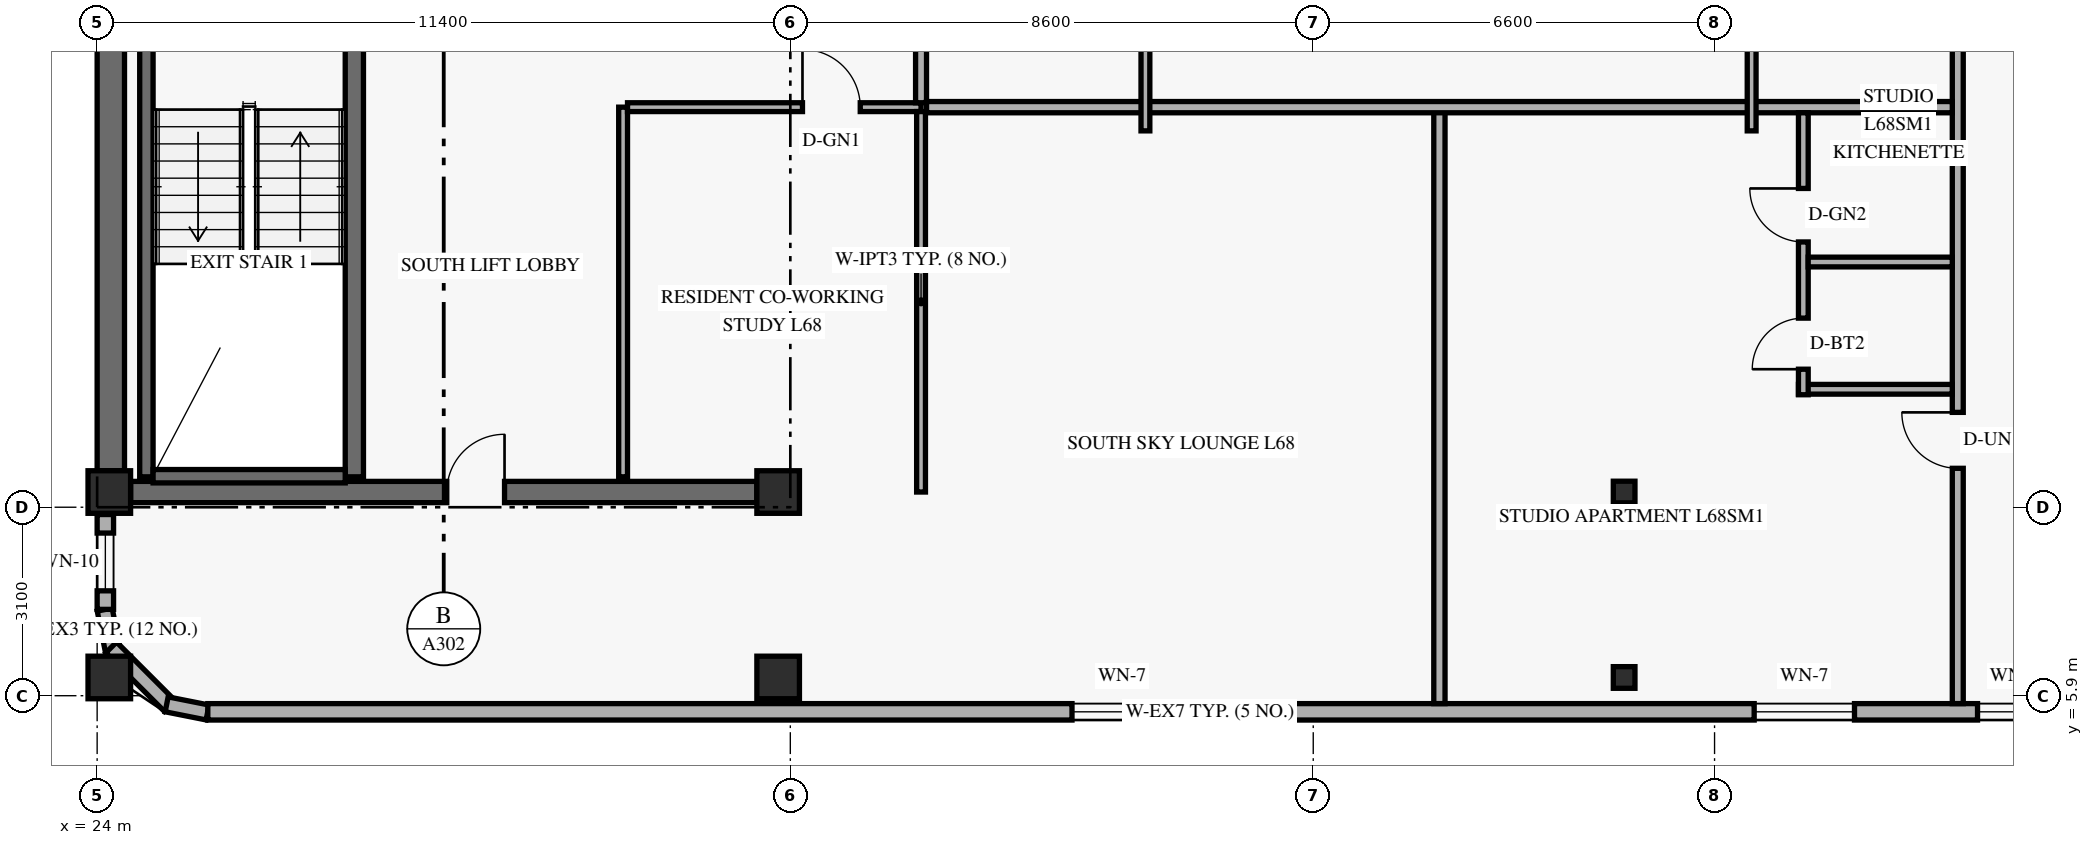
"""IFC4 building model, lengths in metres.
Left out: names, types, materials, properties, quantities, classifications, styles, units other than length and angle.
Written with IfcOpenShell. Run it as: python <this file> out.ifc"""

import sys

from ifc_helpers import new_model, si_unit, direction, frame, frame_2d, origin, origin_2d, place, context, subcontext, project, spatial, rectangle, hollow_rectangle, extrude, element, fill, save


model = new_model("IFC4")
c1 = context("Model", 3, precision=1e-05, world=origin(), true_north=direction((0.0, 1.0)))
c2 = subcontext(c1, "Body", "Model", "MODEL_VIEW")
j1 = project(units=[si_unit("LENGTHUNIT", "METRE"), si_unit("PLANEANGLEUNIT", "RADIAN")], contexts=[c1])
p1 = place(None, origin())
s1 = spatial("IfcSite", under=j1, at=p1, CompositionType="ELEMENT")
p2 = place(p1, origin())
s2 = spatial("IfcBuilding", under=s1, at=p2, CompositionType="ELEMENT")
p3 = place(p2, frame((0.0, 0.0, 260.4)))
s3 = spatial("IfcBuildingStorey", under=s2, at=p3, CompositionType="ELEMENT", Elevation=260.4)
p4 = place(p3, frame((24.225, 9.6, 0.0), z_axis=(0.0, 0.0, 1.0), x_axis=(0.0, 1.0, 0.0)))
e1 = element("IfcWall", 1, at=p4, inside=s3, PredefinedType="SHEAR", context=c2, shape_type="SweptSolid", body=[
    extrude(rectangle(XDim=7.6, YDim=0.45, at=frame_2d((3.8, 0.0))), origin(), (0.0, 0.0, 1.0), 2.821),
])
p5 = place(p3, frame((24.55, 9.25, 0.0), z_axis=(0.0, 0.0, 1.0), x_axis=(1.0, 0.0, 0.0)))
e2 = element("IfcWall", 2, at=p5, inside=s3, PredefinedType="SHEAR", context=c2, shape_type="SweptSolid", body=[
    extrude(rectangle(XDim=10.3, YDim=0.35, at=frame_2d((5.15, 0.0))), origin(), (0.0, 0.0, 1.0), 3.36),
])
p6 = place(p5, frame((5.2, 0.0, 0.0)))
e3 = element("IfcOpeningElement", 3, at=p6, cuts=e2, PredefinedType="OPENING", context=c2, shape_type="SweptSolid", body=[
    extrude(rectangle(XDim=0.95, YDim=2.15, at=frame_2d((0.475, 1.075))), frame((0.0, 0.185, 0.0), z_axis=(0.0, -1.0, 0.0), x_axis=(1.0, 0.0, 0.0)), (0.0, 0.0, 1.0), 0.37),
])
p7 = place(p3, frame((24.81, 9.5, 0.0), z_axis=(0.0, 0.0, 1.0), x_axis=(0.0, 1.0, 0.0)))
e4 = element("IfcWall", 4, at=p7, inside=s3, PredefinedType="SHEAR", context=c2, shape_type="SweptSolid", body=[
    extrude(rectangle(XDim=7.76, YDim=0.22, at=frame_2d((3.88, 0.0))), origin(), (0.0, 0.0, 1.0), 3.36),
])
p8 = place(p3, frame((28.23, 9.5, 0.0), z_axis=(0.0, 0.0, 1.0), x_axis=(0.0, 1.0, 0.0)))
e5 = element("IfcWall", 5, at=p8, inside=s3, PredefinedType="SHEAR", context=c2, shape_type="SweptSolid", body=[
    extrude(rectangle(XDim=7.76, YDim=0.3, at=frame_2d((3.88, 0.0))), origin(), (0.0, 0.0, 1.0), 3.36),
])
p9 = place(p3, frame((24.92, 9.51, 0.0), z_axis=(0.0, 0.0, 1.0), x_axis=(1.0, 0.0, 0.0)))
e6 = element("IfcWall", 6, at=p9, inside=s3, PredefinedType="SHEAR", context=c2, shape_type="SweptSolid", body=[
    extrude(rectangle(XDim=3.16, YDim=0.22, at=frame_2d((1.58, 0.0))), origin(), (0.0, 0.0, 1.0), 3.36),
])
for number, where, z_axis, x_axis in (
    (7, (24.2, 6.2, 0.0), (0.0, 0.0, 1.0), (1.0, 0.0, 0.0)),
    (8, (24.2, 9.25, 0.0), (0.0, 0.0, 1.0), (1.0, 0.0, 0.0)),
    (9, (35.2, 6.2, 0.0), (0.0, 0.0, 1.0), (1.0, 0.0, 0.0)),
    (10, (35.2, 9.25, 0.0), (0.0, 0.0, 1.0), (1.0, 0.0, 0.0)),
):
    element("IfcColumn", number, at=place(p3, frame(where, z_axis=z_axis, x_axis=x_axis)), inside=s3, PredefinedType="COLUMN", context=c2, shape_type="SweptSolid", body=[
        extrude(rectangle(XDim=0.7, YDim=0.7, at=origin_2d()), origin(), (0.0, 0.0, 1.0), 3.6),
    ])
for number, where, z_axis, x_axis in (
    (11, (49.05, 6.2, 0.0), (0.035, 0.0, 0.999), (0.0, 1.0, 0.0)),
    (12, (49.05, 9.25, 0.0), (0.035, 0.0, 0.999), (0.0, 1.0, 0.0)),
):
    element("IfcColumn", number, at=place(p3, frame(where, z_axis=z_axis, x_axis=x_axis)), inside=s3, PredefinedType="COLUMN", context=c2, shape_type="SweptSolid", body=[
        extrude(hollow_rectangle(XDim=0.356, YDim=0.356, WallThickness=0.016, at=origin_2d()), origin(), (0.0, 0.0, 1.0), 3.602),
    ])
p10 = place(p3, frame((24.124, 7.316, 0.0), z_axis=(0.0, 0.0, 1.0), x_axis=(0.194952956674, -0.980812594069, 0.0)))
e13 = element("IfcWall", 13, at=p10, inside=s3, PredefinedType="SOLIDWALL", context=c2, shape_type="SweptSolid", body=[
    extrude(rectangle(XDim=0.686, YDim=0.25, at=frame_2d((0.343, 0.0))), origin(), (0.0, 0.0, 1.0), 2.803),
])
p11 = place(p3, frame((24.231, 6.694, 0.0), z_axis=(0.0, 0.0, 1.0), x_axis=(0.707106781187, -0.707106781187, 0.0)))
e14 = element("IfcWall", 14, at=p11, inside=s3, PredefinedType="SOLIDWALL", context=c2, shape_type="SweptSolid", body=[
    extrude(rectangle(XDim=1.362, YDim=0.25, at=frame_2d((0.681, 0.0))), origin(), (0.0, 0.0, 1.0), 2.803),
])
p12 = place(p3, frame((25.143, 5.758, 0.0), z_axis=(0.0, 0.0, 1.0), x_axis=(0.980812594069, -0.194952956674, 0.0)))
e15 = element("IfcWall", 15, at=p12, inside=s3, PredefinedType="SOLIDWALL", context=c2, shape_type="SweptSolid", body=[
    extrude(rectangle(XDim=0.686, YDim=0.25, at=frame_2d((0.343, 0.0))), origin(), (0.0, 0.0, 1.0), 3.36),
])
p13 = place(p3, frame((25.82, 5.635, 0.0), z_axis=(0.0, 0.0, 1.0), x_axis=(1.0, 0.0, 0.0)))
e16 = element("IfcWall", 16, at=p13, inside=s3, PredefinedType="SOLIDWALL", context=c2, shape_type="SweptSolid", body=[
    extrude(rectangle(XDim=32.96, YDim=0.27, at=frame_2d((16.48, 0.0))), origin(), (0.0, 0.0, 1.0), 3.36),
])
p14 = place(p13, frame((14.212, 0.0, 0.85)))
e17 = element("IfcOpeningElement", 17, at=p14, cuts=e16, PredefinedType="OPENING", context=c2, shape_type="SweptSolid", body=[
    extrude(rectangle(XDim=1.65, YDim=1.6, at=frame_2d((0.825, 0.8))), frame((0.0, 0.145, 0.0), z_axis=(0.0, -1.0, 0.0), x_axis=(1.0, 0.0, 0.0)), (0.0, 0.0, 1.0), 0.29),
])
p15 = place(p13, frame((25.431, 0.0, 0.85)))
e18 = element("IfcOpeningElement", 18, at=p15, cuts=e16, PredefinedType="OPENING", context=c2, shape_type="SweptSolid", body=[
    extrude(rectangle(XDim=1.65, YDim=1.6, at=frame_2d((0.825, 0.8))), frame((0.0, 0.145, 0.0), z_axis=(0.0, -1.0, 0.0), x_axis=(1.0, 0.0, 0.0)), (0.0, 0.0, 1.0), 0.29),
])
p16 = place(p13, frame((29.105, 0.0, 0.85)))
e19 = element("IfcOpeningElement", 19, at=p16, cuts=e16, PredefinedType="OPENING", context=c2, shape_type="SweptSolid", body=[
    extrude(rectangle(XDim=1.2, YDim=1.5, at=frame_2d((0.6, 0.75))), frame((0.0, 0.145, 0.0), z_axis=(0.0, -1.0, 0.0), x_axis=(1.0, 0.0, 0.0)), (0.0, 0.0, 1.0), 0.29),
])
p17 = place(p3, frame((24.135, 7.32, 0.0), z_axis=(0.0, 0.0, 1.0), x_axis=(0.0, 1.0, 0.0)))
e20 = element("IfcWall", 20, at=p17, inside=s3, PredefinedType="SOLIDWALL", context=c2, shape_type="SweptSolid", body=[
    extrude(rectangle(XDim=1.56, YDim=0.27, at=frame_2d((0.78, 0.0))), origin(), (0.0, 0.0, 1.0), 2.803),
])
p18 = place(p17, frame((0.305, 0.0, 0.85)))
e21 = element("IfcOpeningElement", 21, at=p18, cuts=e20, PredefinedType="OPENING", context=c2, shape_type="SweptSolid", body=[
    extrude(rectangle(XDim=0.95, YDim=1.5, at=frame_2d((0.475, 0.75))), frame((0.0, 0.145, 0.0), z_axis=(0.0, -1.0, 0.0), x_axis=(1.0, 0.0, 0.0)), (0.0, 0.0, 1.0), 0.29),
])
p19 = place(p3, frame((32.65, 9.5, 0.0), z_axis=(0.0, 0.0, 1.0), x_axis=(0.0, 1.0, 0.0)))
e22 = element("IfcWall", 22, at=p19, inside=s3, PredefinedType="PARTITIONING", context=c2, shape_type="SweptSolid", body=[
    extrude(rectangle(XDim=6.08, YDim=0.145, at=frame_2d((3.04, 0.0))), origin(), (0.0, 0.0, 1.0), 3.36),
])
p20 = place(p3, frame((32.722, 15.58, 0.0), z_axis=(0.0, 0.0, 1.0), x_axis=(1.0, 0.0, 0.0)))
e23 = element("IfcWall", 23, at=p20, inside=s3, PredefinedType="PARTITIONING", context=c2, shape_type="SweptSolid", body=[
    extrude(rectangle(XDim=4.828, YDim=0.145, at=frame_2d((2.414, 0.0))), origin(), (0.0, 0.0, 1.0), 2.803),
])
p21 = place(p20, frame((2.877, 0.0, 0.0)))
e24 = element("IfcOpeningElement", 24, at=p21, cuts=e23, PredefinedType="OPENING", context=c2, shape_type="SweptSolid", body=[
    extrude(rectangle(XDim=0.95, YDim=2.15, at=frame_2d((0.475, 1.075))), frame((0.0, 0.083, 0.0), z_axis=(0.0, -1.0, 0.0), x_axis=(1.0, 0.0, 0.0)), (0.0, 0.0, 1.0), 0.165),
])
p22 = place(p3, frame((37.55, 9.25, 0.0), z_axis=(0.0, 0.0, 1.0), x_axis=(0.0, 1.0, 0.0)))
e25 = element("IfcWall", 25, at=p22, inside=s3, PredefinedType="PARTITIONING", context=c2, shape_type="SweptSolid", body=[
    extrude(rectangle(XDim=6.258, YDim=0.145, at=frame_2d((3.129, 0.0))), origin(), (0.0, 0.0, 1.0), 2.803),
])
p23 = place(p3, frame((37.55, 15.653, 0.0), z_axis=(0.0, 0.0, 1.0), x_axis=(0.0, 1.0, 0.0)))
e26 = element("IfcWall", 26, at=p23, inside=s3, PredefinedType="STANDARD", context=c2, shape_type="SweptSolid", body=[
    extrude(rectangle(XDim=9.347, YDim=0.18, at=frame_2d((4.674, 0.0))), origin(), (0.0, 0.0, 1.0), 2.803),
])
p24 = place(p3, frame((54.6, 5.77, 0.0), z_axis=(0.0, 0.0, 1.0), x_axis=(0.0, 1.0, 0.0)))
e27 = element("IfcWall", 27, at=p24, inside=s3, PredefinedType="STANDARD", context=c2, shape_type="SweptSolid", body=[
    extrude(rectangle(XDim=19.23, YDim=0.18, at=frame_2d((9.615, 0.0))), origin(), (0.0, 0.0, 1.0), 2.803),
])
p25 = place(p24, frame((3.87, 0.0, 0.0)))
e28 = element("IfcOpeningElement", 28, at=p25, cuts=e27, PredefinedType="OPENING", context=c2, shape_type="SweptSolid", body=[
    extrude(rectangle(XDim=0.92, YDim=2.15, at=frame_2d((0.46, 1.075))), frame((0.0, 0.1, 0.0), z_axis=(0.0, -1.0, 0.0), x_axis=(1.0, 0.0, 0.0)), (0.0, 0.0, 1.0), 0.2),
])
p26 = place(p3, frame((46.075, 5.77, 0.0), z_axis=(0.0, 0.0, 1.0), x_axis=(0.0, 1.0, 0.0)))
e29 = element("IfcWall", 29, at=p26, inside=s3, PredefinedType="PARTITIONING", context=c2, shape_type="SweptSolid", body=[
    extrude(rectangle(XDim=9.81, YDim=0.185, at=frame_2d((4.905, 0.0))), origin(), (0.0, 0.0, 1.0), 2.803),
])
p27 = place(p3, frame((37.64, 15.58, 0.0), z_axis=(0.0, 0.0, 1.0), x_axis=(1.0, 0.0, 0.0)))
e30 = element("IfcWall", 30, at=p27, inside=s3, PredefinedType="PARTITIONING", context=c2, shape_type="SweptSolid", body=[
    extrude(rectangle(XDim=16.87, YDim=0.185, at=frame_2d((8.435, 0.0))), origin(), (0.0, 0.0, 1.0), 2.803),
])
p28 = place(p3, frame((51.98, 10.94, 0.0), z_axis=(0.0, 0.0, 1.0), x_axis=(1.0, 0.0, 0.0)))
e31 = element("IfcWall", 31, at=p28, inside=s3, PredefinedType="PLUMBINGWALL", context=c2, shape_type="SweptSolid", body=[
    extrude(rectangle(XDim=2.53, YDim=0.16, at=frame_2d((1.265, 0.0))), origin(), (0.0, 0.0, 1.0), 3.36),
])
p29 = place(p3, frame((52.06, 10.85, 0.0), z_axis=(0.0, 0.0, 1.0), x_axis=(0.0, 1.0, 0.0)))
e32 = element("IfcWall", 32, at=p29, inside=s3, PredefinedType="PLUMBINGWALL", context=c2, shape_type="SweptSolid", body=[
    extrude(rectangle(XDim=4.637, YDim=0.16, at=frame_2d((2.319, 0.0))), origin(), (0.0, 0.0, 1.0), 3.039),
])
p30 = place(p29, frame((0.42, 0.0, 0.0)))
e33 = element("IfcOpeningElement", 33, at=p30, cuts=e32, PredefinedType="OPENING", context=c2, shape_type="SweptSolid", body=[
    extrude(rectangle(XDim=0.84, YDim=2.12, at=frame_2d((0.42, 1.06))), frame((0.0, 0.09, 0.0), z_axis=(0.0, -1.0, 0.0), x_axis=(1.0, 0.0, 0.0)), (0.0, 0.0, 1.0), 0.18),
])
p31 = place(p29, frame((2.513, 0.0, 0.0)))
e34 = element("IfcOpeningElement", 34, at=p31, cuts=e32, PredefinedType="OPENING", context=c2, shape_type="SweptSolid", body=[
    extrude(rectangle(XDim=0.88, YDim=2.12, at=frame_2d((0.44, 1.06))), frame((0.0, 0.09, 0.0), z_axis=(0.0, -1.0, 0.0), x_axis=(1.0, 0.0, 0.0)), (0.0, 0.0, 1.0), 0.18),
])
p32 = place(p3, frame((52.14, 13.033, 0.0), z_axis=(0.0, 0.0, 1.0), x_axis=(1.0, 0.0, 0.0)))
e35 = element("IfcWall", 35, at=p32, inside=s3, PredefinedType="PLUMBINGWALL", context=c2, shape_type="SweptSolid", body=[
    extrude(rectangle(XDim=2.37, YDim=0.16, at=frame_2d((1.185, 0.0))), origin(), (0.0, 0.0, 1.0), 3.36),
])
p33 = place(p3, frame((51.21, 15.19, 0.0), z_axis=(0.0, 0.0, 1.0), x_axis=(0.0, 1.0, 0.0)))
e36 = element("IfcWall", 36, at=p33, inside=s3, PredefinedType="PARTITIONING", context=c2, shape_type="SweptSolid", body=[
    extrude(rectangle(XDim=9.72, YDim=0.145, at=frame_2d((4.86, 0.0))), origin(), (0.0, 0.0, 1.0), 2.803),
])
p34 = place(p33, frame((2.445, 0.0, 0.0)))
e37 = element("IfcOpeningElement", 37, at=p34, cuts=e36, PredefinedType="OPENING", context=c2, shape_type="SweptSolid", body=[
    extrude(rectangle(XDim=0.88, YDim=2.14, at=frame_2d((0.44, 1.07))), frame((0.0, 0.083, 0.0), z_axis=(0.0, -1.0, 0.0), x_axis=(1.0, 0.0, 0.0)), (0.0, 0.0, 1.0), 0.165),
])
p35 = place(p33, frame((5.84, 0.0, 0.0)))
e38 = element("IfcOpeningElement", 38, at=p35, cuts=e36, PredefinedType="OPENING", context=c2, shape_type="SweptSolid", body=[
    extrude(rectangle(XDim=0.88, YDim=2.12, at=frame_2d((0.44, 1.06))), frame((0.0, 0.083, 0.0), z_axis=(0.0, -1.0, 0.0), x_axis=(1.0, 0.0, 0.0)), (0.0, 0.0, 1.0), 0.165),
])
p36 = place(p3, frame((41.24, 15.19, 0.0), z_axis=(0.0, 0.0, 1.0), x_axis=(0.0, 1.0, 0.0)))
e39 = element("IfcWall", 39, at=p36, inside=s3, PredefinedType="PARTITIONING", context=c2, shape_type="SweptSolid", body=[
    extrude(rectangle(XDim=9.72, YDim=0.145, at=frame_2d((4.86, 0.0))), origin(), (0.0, 0.0, 1.0), 2.803),
])
p37 = place(p36, frame((4.17, 0.0, 0.0)))
e40 = element("IfcOpeningElement", 40, at=p37, cuts=e39, PredefinedType="OPENING", context=c2, shape_type="SweptSolid", body=[
    extrude(rectangle(XDim=0.95, YDim=2.15, at=frame_2d((0.475, 1.075))), frame((0.0, 0.083, 0.0), z_axis=(0.0, -1.0, 0.0), x_axis=(1.0, 0.0, 0.0)), (0.0, 0.0, 1.0), 0.165),
])
p38 = place(p14, origin())
e41 = element("IfcWindow", 41, at=p38, inside=s3, PartitioningType="SINGLE_PANEL", PredefinedType="WINDOW", context=c2, shape_type="SweptSolid", body=[
    extrude(rectangle(XDim=1.65, YDim=1.6, at=frame_2d((0.825, 0.8))), frame((0.0, 0.03, 0.0), z_axis=(0.0, -1.0, 0.0), x_axis=(1.0, 0.0, 0.0)), (0.0, 0.0, 1.0), 0.06),
])
fill(e17, e41)
p39 = place(p15, origin())
e42 = element("IfcWindow", 42, at=p39, inside=s3, PartitioningType="SINGLE_PANEL", PredefinedType="WINDOW", context=c2, shape_type="SweptSolid", body=[
    extrude(rectangle(XDim=1.65, YDim=1.6, at=frame_2d((0.825, 0.8))), frame((0.0, 0.03, 0.0), z_axis=(0.0, -1.0, 0.0), x_axis=(1.0, 0.0, 0.0)), (0.0, 0.0, 1.0), 0.06),
])
fill(e18, e42)
p40 = place(p16, origin())
e43 = element("IfcWindow", 43, at=p40, inside=s3, PartitioningType="SINGLE_PANEL", PredefinedType="WINDOW", context=c2, shape_type="SweptSolid", body=[
    extrude(rectangle(XDim=1.2, YDim=1.5, at=frame_2d((0.6, 0.75))), frame((0.0, 0.03, 0.0), z_axis=(0.0, -1.0, 0.0), x_axis=(1.0, 0.0, 0.0)), (0.0, 0.0, 1.0), 0.06),
])
fill(e19, e43)
p41 = place(p18, origin())
e44 = element("IfcWindow", 44, at=p41, inside=s3, PartitioningType="SINGLE_PANEL", PredefinedType="WINDOW", context=c2, shape_type="SweptSolid", body=[
    extrude(rectangle(XDim=0.95, YDim=1.5, at=frame_2d((0.475, 0.75))), frame((0.0, 0.03, 0.0), z_axis=(0.0, -1.0, 0.0), x_axis=(1.0, 0.0, 0.0)), (0.0, 0.0, 1.0), 0.06),
])
fill(e21, e44)
p42 = place(p21, origin())
e45 = element("IfcDoor", 45, at=p42, inside=s3, OperationType="SINGLE_SWING_LEFT", PredefinedType="DOOR", context=c2, shape_type="SweptSolid", body=[
    extrude(rectangle(XDim=0.95, YDim=2.15, at=frame_2d((0.475, 1.075))), frame((0.0, 0.025, 0.0), z_axis=(0.0, -1.0, 0.0), x_axis=(1.0, 0.0, 0.0)), (0.0, 0.0, 1.0), 0.05),
])
fill(e24, e45)
p43 = place(p6, frame((0.95, 0.0, 0.0), z_axis=(0.0, 0.0, 1.0), x_axis=(-1.0, 0.0, 0.0)))
e46 = element("IfcDoor", 46, at=p43, inside=s3, OperationType="SINGLE_SWING_LEFT", PredefinedType="DOOR", context=c2, shape_type="SweptSolid", body=[
    extrude(rectangle(XDim=0.95, YDim=2.15, at=frame_2d((0.475, 1.075))), frame((0.0, 0.025, 0.0), z_axis=(0.0, -1.0, 0.0), x_axis=(1.0, 0.0, 0.0)), (0.0, 0.0, 1.0), 0.05),
])
fill(e3, e46)
p44 = place(p25, origin())
e47 = element("IfcDoor", 47, at=p44, inside=s3, OperationType="SINGLE_SWING_RIGHT", PredefinedType="DOOR", context=c2, shape_type="SweptSolid", body=[
    extrude(rectangle(XDim=0.92, YDim=2.15, at=frame_2d((0.46, 1.075))), frame((0.0, 0.025, 0.0), z_axis=(0.0, -1.0, 0.0), x_axis=(1.0, 0.0, 0.0)), (0.0, 0.0, 1.0), 0.05),
])
fill(e28, e47)
p45 = place(p30, origin())
e48 = element("IfcDoor", 48, at=p45, inside=s3, OperationType="SINGLE_SWING_LEFT", PredefinedType="DOOR", context=c2, shape_type="SweptSolid", body=[
    extrude(rectangle(XDim=0.84, YDim=2.12, at=frame_2d((0.42, 1.06))), frame((0.0, 0.025, 0.0), z_axis=(0.0, -1.0, 0.0), x_axis=(1.0, 0.0, 0.0)), (0.0, 0.0, 1.0), 0.05),
])
fill(e33, e48)
p46 = place(p31, origin())
e49 = element("IfcDoor", 49, at=p46, inside=s3, OperationType="SINGLE_SWING_RIGHT", PredefinedType="DOOR", context=c2, shape_type="SweptSolid", body=[
    extrude(rectangle(XDim=0.88, YDim=2.12, at=frame_2d((0.44, 1.06))), frame((0.0, 0.025, 0.0), z_axis=(0.0, -1.0, 0.0), x_axis=(1.0, 0.0, 0.0)), (0.0, 0.0, 1.0), 0.05),
])
fill(e34, e49)
save(model, sys.argv[1])
